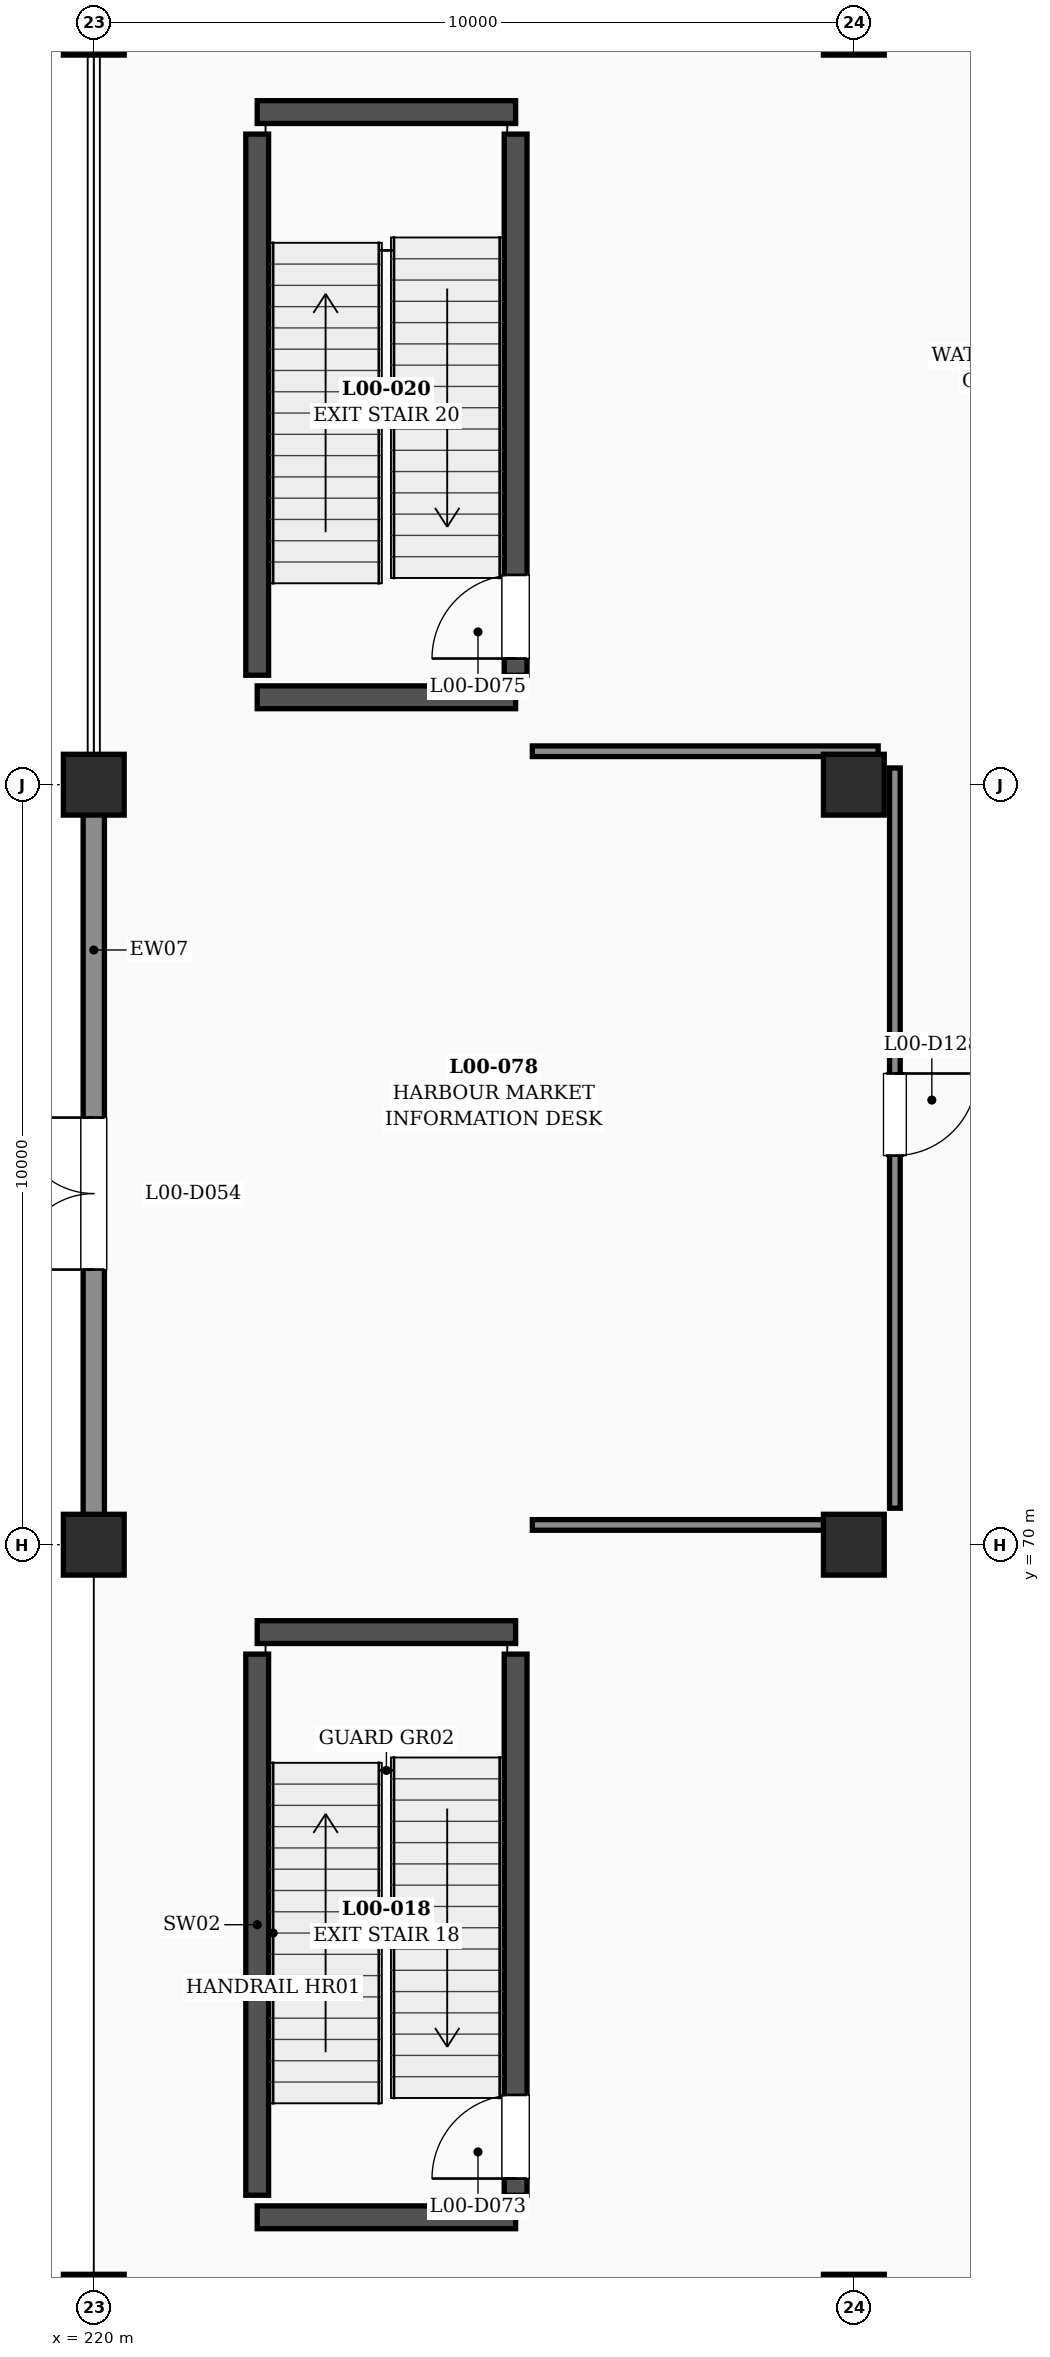
"""IFC4 building model, lengths in metres.
Left out: names, types, materials, properties, quantities, classifications, styles, units other than length and angle.
Written with IfcOpenShell. Run it as: python <this file> out.ifc"""

import sys

from ifc_helpers import new_model, si_unit, direction, frame, frame_2d, origin, origin_2d, place, context, subcontext, project, spatial, rectangle, extrude, element, fill, save


model = new_model("IFC4")
c1 = context("Model", 3, precision=1e-05, world=origin(), true_north=direction((0.0, 1.0)))
c2 = subcontext(c1, "Body", "Model", "MODEL_VIEW")
j1 = project(units=[si_unit("LENGTHUNIT", "METRE"), si_unit("PLANEANGLEUNIT", "RADIAN")], contexts=[c1])
p1 = place(None, origin())
s1 = spatial("IfcSite", under=j1, at=p1, CompositionType="ELEMENT")
p2 = place(p1, origin())
s2 = spatial("IfcBuilding", under=s1, at=p2, CompositionType="ELEMENT")
p3 = place(p2, origin())
s3 = spatial("IfcBuildingStorey", under=s2, at=p3, CompositionType="ELEMENT", Elevation=0.0)
for number, where, z_axis, x_axis in (
    (1, (220.0, 60.0, 0.0), (0.0, 0.0, 1.0), (1.0, 0.0, 0.0)),
    (2, (220.0, 70.0, 0.0), (0.0, 0.0, 1.0), (1.0, 0.0, 0.0)),
    (3, (220.0, 80.0, 0.0), (0.0, 0.0, 1.0), (1.0, 0.0, 0.0)),
    (4, (220.0, 90.0, 0.0), (0.0, 0.0, 1.0), (1.0, 0.0, 0.0)),
    (5, (230.0, 60.0, 0.0), (0.0, 0.0, 1.0), (1.0, 0.0, 0.0)),
    (6, (230.0, 70.0, 0.0), (0.0, 0.0, 1.0), (1.0, 0.0, 0.0)),
    (7, (230.0, 80.0, 0.0), (0.0, 0.0, 1.0), (1.0, 0.0, 0.0)),
    (8, (230.0, 90.0, 0.0), (0.0, 0.0, 1.0), (1.0, 0.0, 0.0)),
):
    element("IfcColumn", number, at=place(p3, frame(where, z_axis=z_axis, x_axis=x_axis)), inside=s3, PredefinedType="COLUMN", context=c2, shape_type="SweptSolid", body=[
        extrude(rectangle(XDim=0.8, YDim=0.8, at=origin_2d()), origin(), (0.0, 0.0, 1.0), 6.0),
    ])
p4 = place(p3, frame((220.0, 70.22, 0.0), z_axis=(0.0, 0.0, 1.0), x_axis=(0.0, 1.0, 0.0)))
e9 = element("IfcWall", 9, at=p4, inside=s3, PredefinedType="SOLIDWALL", context=c2, shape_type="SweptSolid", body=[
    extrude(rectangle(XDim=9.56, YDim=0.28, at=frame_2d((4.78, 0.0))), origin(), (0.0, 0.0, 1.0), 4.96),
])
p5 = place(p4, frame((3.4, 0.0, 0.0)))
e10 = element("IfcOpeningElement", 10, at=p5, cuts=e9, PredefinedType="OPENING", context=c2, shape_type="SweptSolid", body=[
    extrude(rectangle(XDim=2.0, YDim=2.4, at=frame_2d((1.0, 1.2))), frame((0.0, 0.15, 0.0), z_axis=(0.0, -1.0, 0.0), x_axis=(1.0, 0.0, 0.0)), (0.0, 0.0, 1.0), 0.3),
])
for number, where, z_axis, x_axis in (
    (11, (222.15, 61.15, 0.0), (0.0, 0.0, 1.0), (1.0, 0.0, 0.0)),
    (12, (222.15, 68.85, 0.0), (0.0, 0.0, 1.0), (1.0, 0.0, 0.0)),
):
    element("IfcWall", number, at=place(p3, frame(where, z_axis=z_axis, x_axis=x_axis)), inside=s3, PredefinedType="SHEAR", context=c2, shape_type="SweptSolid", body=[
        extrude(rectangle(XDim=3.4, YDim=0.3, at=frame_2d((1.7, 0.0))), origin(), (0.0, 0.0, 1.0), 6.0),
    ])
p6 = place(p3, frame((222.15, 61.44, 0.0), z_axis=(0.0, 0.0, 1.0), x_axis=(0.0, 1.0, 0.0)))
e13 = element("IfcWall", 13, at=p6, inside=s3, PredefinedType="SHEAR", context=c2, shape_type="SweptSolid", body=[
    extrude(rectangle(XDim=7.12, YDim=0.3, at=frame_2d((3.56, 0.0))), origin(), (0.0, 0.0, 1.0), 6.0),
])
p7 = place(p3, frame((225.55, 61.44, 0.0), z_axis=(0.0, 0.0, 1.0), x_axis=(0.0, 1.0, 0.0)))
e14 = element("IfcWall", 14, at=p7, inside=s3, PredefinedType="SHEAR", context=c2, shape_type="SweptSolid", body=[
    extrude(rectangle(XDim=7.12, YDim=0.3, at=frame_2d((3.56, 0.0))), origin(), (0.0, 0.0, 1.0), 6.0),
])
p8 = place(p7, frame((0.22, 0.0, 0.0)))
e15 = element("IfcOpeningElement", 15, at=p8, cuts=e14, PredefinedType="OPENING", context=c2, shape_type="SweptSolid", body=[
    extrude(rectangle(XDim=1.1, YDim=2.2, at=frame_2d((0.55, 1.1))), frame((0.0, 0.16, 0.0), z_axis=(0.0, -1.0, 0.0), x_axis=(1.0, 0.0, 0.0)), (0.0, 0.0, 1.0), 0.32),
])
for number, where, z_axis, x_axis in (
    (16, (222.15, 81.15, 0.0), (0.0, 0.0, 1.0), (1.0, 0.0, 0.0)),
    (17, (222.15, 88.85, 0.0), (0.0, 0.0, 1.0), (1.0, 0.0, 0.0)),
):
    element("IfcWall", number, at=place(p3, frame(where, z_axis=z_axis, x_axis=x_axis)), inside=s3, PredefinedType="SHEAR", context=c2, shape_type="SweptSolid", body=[
        extrude(rectangle(XDim=3.4, YDim=0.3, at=frame_2d((1.7, 0.0))), origin(), (0.0, 0.0, 1.0), 6.0),
    ])
p9 = place(p3, frame((222.15, 81.44, 0.0), z_axis=(0.0, 0.0, 1.0), x_axis=(0.0, 1.0, 0.0)))
e18 = element("IfcWall", 18, at=p9, inside=s3, PredefinedType="SHEAR", context=c2, shape_type="SweptSolid", body=[
    extrude(rectangle(XDim=7.12, YDim=0.3, at=frame_2d((3.56, 0.0))), origin(), (0.0, 0.0, 1.0), 6.0),
])
p10 = place(p3, frame((225.55, 81.44, 0.0), z_axis=(0.0, 0.0, 1.0), x_axis=(0.0, 1.0, 0.0)))
e19 = element("IfcWall", 19, at=p10, inside=s3, PredefinedType="SHEAR", context=c2, shape_type="SweptSolid", body=[
    extrude(rectangle(XDim=7.12, YDim=0.3, at=frame_2d((3.56, 0.0))), origin(), (0.0, 0.0, 1.0), 6.0),
])
p11 = place(p10, frame((0.22, 0.0, 0.0)))
e20 = element("IfcOpeningElement", 20, at=p11, cuts=e19, PredefinedType="OPENING", context=c2, shape_type="SweptSolid", body=[
    extrude(rectangle(XDim=1.1, YDim=2.2, at=frame_2d((0.55, 1.1))), frame((0.0, 0.16, 0.0), z_axis=(0.0, -1.0, 0.0), x_axis=(1.0, 0.0, 0.0)), (0.0, 0.0, 1.0), 0.32),
])
p12 = place(p3, frame((225.77, 80.44, 0.0), z_axis=(0.0, 0.0, 1.0), x_axis=(1.0, 0.0, 0.0)))
e21 = element("IfcWall", 21, at=p12, inside=s3, PredefinedType="PARTITIONING", context=c2, shape_type="SweptSolid", body=[
    extrude(rectangle(XDim=4.55, YDim=0.14, at=frame_2d((2.275, 0.0))), origin(), (0.0, 0.0, 1.0), 5.66),
])
p13 = place(p3, frame((230.54, 80.22, 0.0), z_axis=(0.0, 0.0, 1.0), x_axis=(0.0, -1.0, 0.0)))
e22 = element("IfcWall", 22, at=p13, inside=s3, PredefinedType="PARTITIONING", context=c2, shape_type="SweptSolid", body=[
    extrude(rectangle(XDim=9.74, YDim=0.14, at=frame_2d((4.87, 0.0))), origin(), (0.0, 0.0, 1.0), 5.66),
])
p14 = place(p13, frame((4.02, 0.0, 0.0)))
e23 = element("IfcOpeningElement", 23, at=p14, cuts=e22, PredefinedType="OPENING", context=c2, shape_type="SweptSolid", body=[
    extrude(rectangle(XDim=1.08, YDim=2.2, at=frame_2d((0.54, 1.1))), frame((0.0, 0.08, 0.0), z_axis=(0.0, -1.0, 0.0), x_axis=(1.0, 0.0, 0.0)), (0.0, 0.0, 1.0), 0.16),
])
p15 = place(p3, frame((230.32, 70.26, 0.0), z_axis=(0.0, 0.0, 1.0), x_axis=(-1.0, 0.0, 0.0)))
e24 = element("IfcWall", 24, at=p15, inside=s3, PredefinedType="PARTITIONING", context=c2, shape_type="SweptSolid", body=[
    extrude(rectangle(XDim=4.55, YDim=0.14, at=frame_2d((2.275, 0.0))), origin(), (0.0, 0.0, 1.0), 4.91),
])
p16 = place(p5, origin())
e25 = element("IfcDoor", 25, at=p16, inside=s3, OperationType="DOUBLE_DOOR_SINGLE_SWING", PredefinedType="DOOR", context=c2, shape_type="SweptSolid", body=[
    extrude(rectangle(XDim=2.0, YDim=2.4, at=frame_2d((1.0, 1.2))), frame((0.0, 0.025, 0.0), z_axis=(0.0, -1.0, 0.0), x_axis=(1.0, 0.0, 0.0)), (0.0, 0.0, 1.0), 0.05),
])
fill(e10, e25)
p17 = place(p8, origin())
e26 = element("IfcDoor", 26, at=p17, inside=s3, OperationType="SINGLE_SWING_LEFT", PredefinedType="DOOR", context=c2, shape_type="SweptSolid", body=[
    extrude(rectangle(XDim=1.1, YDim=2.2, at=frame_2d((0.55, 1.1))), frame((0.0, 0.025, 0.0), z_axis=(0.0, -1.0, 0.0), x_axis=(1.0, 0.0, 0.0)), (0.0, 0.0, 1.0), 0.05),
])
fill(e15, e26)
p18 = place(p11, origin())
e27 = element("IfcDoor", 27, at=p18, inside=s3, OperationType="SINGLE_SWING_LEFT", PredefinedType="DOOR", context=c2, shape_type="SweptSolid", body=[
    extrude(rectangle(XDim=1.1, YDim=2.2, at=frame_2d((0.55, 1.1))), frame((0.0, 0.025, 0.0), z_axis=(0.0, -1.0, 0.0), x_axis=(1.0, 0.0, 0.0)), (0.0, 0.0, 1.0), 0.05),
])
fill(e20, e27)
p19 = place(p14, origin())
e28 = element("IfcDoor", 28, at=p19, inside=s3, OperationType="SINGLE_SWING_LEFT", PredefinedType="DOOR", context=c2, shape_type="SweptSolid", body=[
    extrude(rectangle(XDim=1.08, YDim=2.2, at=frame_2d((0.54, 1.1))), frame((0.0, 0.025, 0.0), z_axis=(0.0, -1.0, 0.0), x_axis=(1.0, 0.0, 0.0)), (0.0, 0.0, 1.0), 0.05),
])
fill(e23, e28)
save(model, sys.argv[1])
